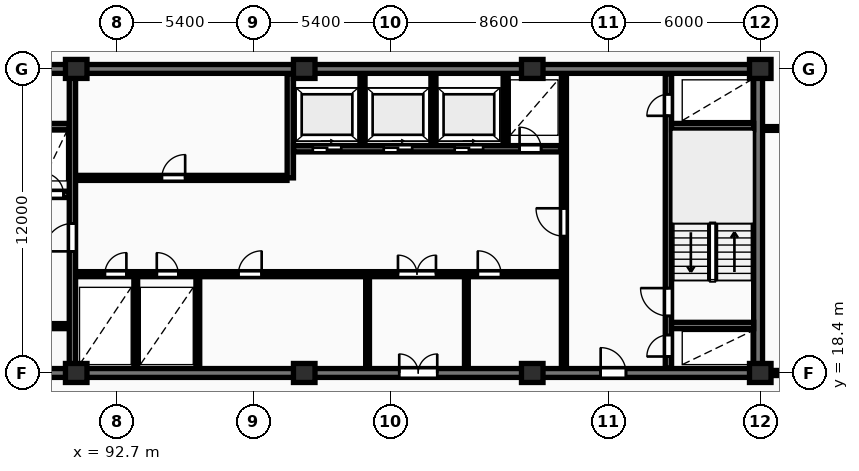
"""IFC4 building model, lengths in metres.
Left out: names, types, materials, properties, quantities, classifications, styles, units other than length and angle.
Written with IfcOpenShell. Run it as: python <this file> out.ifc"""

import sys

from ifc_helpers import new_model, si_unit, direction, frame, frame_2d, origin, origin_2d, place, context, subcontext, project, spatial, rectangle, extrude, element, fill, save


model = new_model("IFC4")
c1 = context("Model", 3, precision=1e-05, world=origin(), true_north=direction((0.0, 1.0)))
c2 = subcontext(c1, "Body", "Model", "MODEL_VIEW")
j1 = project(units=[si_unit("LENGTHUNIT", "METRE"), si_unit("PLANEANGLEUNIT", "RADIAN")], contexts=[c1])
p1 = place(None, origin())
s1 = spatial("IfcSite", under=j1, at=p1, CompositionType="ELEMENT")
p2 = place(p1, origin())
s2 = spatial("IfcBuilding", under=s1, at=p2, CompositionType="ELEMENT")
p3 = place(p2, frame((0.0, 0.0, 132.8)))
s3 = spatial("IfcBuildingStorey", under=s2, at=p3, CompositionType="ELEMENT", Elevation=132.8)
for number, where, z_axis, x_axis in (
    (1, (91.1, 18.4, 0.0), (0.0, 0.0, 1.0), (1.0, 0.0, 0.0)),
    (2, (91.1, 30.4, 0.0), (0.0, 0.0, 1.0), (1.0, 0.0, 0.0)),
    (3, (100.1, 18.4, 0.0), (0.0, 0.0, 1.0), (1.0, 0.0, 0.0)),
    (4, (100.1, 30.4, 0.0), (0.0, 0.0, 1.0), (1.0, 0.0, 0.0)),
    (5, (109.1, 18.4, 0.0), (0.0, 0.0, 1.0), (1.0, 0.0, 0.0)),
    (6, (109.1, 30.4, 0.0), (0.0, 0.0, 1.0), (1.0, 0.0, 0.0)),
    (7, (118.1, 18.4, 0.0), (0.0, 0.0, 1.0), (1.0, 0.0, 0.0)),
    (8, (118.1, 30.4, 0.0), (0.0, 0.0, 1.0), (1.0, 0.0, 0.0)),
):
    element("IfcColumn", number, at=place(p3, frame(where, z_axis=z_axis, x_axis=x_axis)), inside=s3, PredefinedType="COLUMN", context=c2, shape_type="SweptSolid", body=[
        extrude(rectangle(XDim=0.85, YDim=0.75, at=origin_2d()), origin(), (0.0, 0.0, 1.0), 3.25),
    ])
p4 = place(p3, frame((81.925, 30.4, 0.0), z_axis=(0.0, 0.0, 1.0), x_axis=(1.0, 0.0, 0.0)))
e9 = element("IfcWall", 9, at=p4, inside=s3, PredefinedType="SHEAR", context=c2, shape_type="SweptSolid", body=[
    extrude(rectangle(XDim=36.265, YDim=0.35, at=frame_2d((18.132, 0.0))), origin(), (0.0, 0.0, 1.0), 3.25),
])
p5 = place(p3, frame((118.015, 18.575, 0.0), z_axis=(0.0, 0.0, 1.0), x_axis=(0.0, 1.0, 0.0)))
e10 = element("IfcWall", 10, at=p5, inside=s3, PredefinedType="SHEAR", context=c2, shape_type="SweptSolid", body=[
    extrude(rectangle(XDim=11.65, YDim=0.35, at=frame_2d((5.825, 0.0))), origin(), (0.0, 0.0, 1.0), 3.25),
])
p6 = place(p3, frame((81.925, 18.4, 0.0), z_axis=(0.0, 0.0, 1.0), x_axis=(1.0, 0.0, 0.0)))
e11 = element("IfcWall", 11, at=p6, inside=s3, PredefinedType="SHEAR", context=c2, shape_type="SweptSolid", body=[
    extrude(rectangle(XDim=36.265, YDim=0.35, at=frame_2d((18.132, 0.0))), origin(), (0.0, 0.0, 1.0), 3.25),
])
p7 = place(p6, frame((5.675, 0.0, 0.0)))
e12 = element("IfcOpeningElement", 12, at=p7, cuts=e11, PredefinedType="OPENING", context=c2, shape_type="SweptSolid", body=[
    extrude(rectangle(XDim=1.0, YDim=2.15, at=frame_2d((0.5, 1.075))), frame((0.0, 0.185, 0.0), z_axis=(0.0, -1.0, 0.0), x_axis=(1.0, 0.0, 0.0)), (0.0, 0.0, 1.0), 0.37),
])
p8 = place(p6, frame((21.925, 0.0, 0.0)))
e13 = element("IfcOpeningElement", 13, at=p8, cuts=e11, PredefinedType="OPENING", context=c2, shape_type="SweptSolid", body=[
    extrude(rectangle(XDim=1.5, YDim=2.2, at=frame_2d((0.75, 1.1))), frame((0.0, 0.185, 0.0), z_axis=(0.0, -1.0, 0.0), x_axis=(1.0, 0.0, 0.0)), (0.0, 0.0, 1.0), 0.37),
])
p9 = place(p6, frame((29.875, 0.0, 0.0)))
e14 = element("IfcOpeningElement", 14, at=p9, cuts=e11, PredefinedType="OPENING", context=c2, shape_type="SweptSolid", body=[
    extrude(rectangle(XDim=1.0, YDim=2.15, at=frame_2d((0.5, 1.075))), frame((0.0, 0.185, 0.0), z_axis=(0.0, -1.0, 0.0), x_axis=(1.0, 0.0, 0.0)), (0.0, 0.0, 1.0), 0.37),
])
p10 = place(p3, frame((83.0, 28.125, 0.0), z_axis=(0.0, 0.0, 1.0), x_axis=(1.0, 0.0, 0.0)))
e15 = element("IfcWall", 15, at=p10, inside=s3, PredefinedType="SHEAR", context=c2, shape_type="SweptSolid", body=[
    extrude(rectangle(XDim=7.82, YDim=0.25, at=frame_2d((3.91, 0.0))), origin(), (0.0, 0.0, 1.0), 3.25),
])
p11 = place(p3, frame((86.5, 25.45, 0.0), z_axis=(0.0, 0.0, 1.0), x_axis=(1.0, 0.0, 0.0)))
e16 = element("IfcWall", 16, at=p11, inside=s3, PredefinedType="SHEAR", context=c2, shape_type="SweptSolid", body=[
    extrude(rectangle(XDim=4.32, YDim=0.25, at=frame_2d((2.16, 0.0))), origin(), (0.0, 0.0, 1.0), 3.25),
])
p12 = place(p11, frame((1.14, 0.0, 0.0)))
e17 = element("IfcOpeningElement", 17, at=p12, cuts=e16, PredefinedType="OPENING", context=c2, shape_type="SweptSolid", body=[
    extrude(rectangle(XDim=1.12, YDim=2.12, at=frame_2d((0.56, 1.06))), frame((0.0, 0.135, 0.0), z_axis=(0.0, -1.0, 0.0), x_axis=(1.0, 0.0, 0.0)), (0.0, 0.0, 1.0), 0.27),
])
p13 = place(p11, frame((3.25, 0.0, 0.0)))
e18 = element("IfcOpeningElement", 18, at=p13, cuts=e16, PredefinedType="OPENING", context=c2, shape_type="SweptSolid", body=[
    extrude(rectangle(XDim=0.85, YDim=2.05, at=frame_2d((0.425, 1.025))), frame((0.0, 0.135, 0.0), z_axis=(0.0, -1.0, 0.0), x_axis=(1.0, 0.0, 0.0)), (0.0, 0.0, 1.0), 0.27),
])
p14 = place(p3, frame((86.5, 20.25, 0.0), z_axis=(0.0, 0.0, 1.0), x_axis=(1.0, 0.0, 0.0)))
e19 = element("IfcWall", 19, at=p14, inside=s3, PredefinedType="PARTITIONING", context=c2, shape_type="SweptSolid", body=[
    extrude(rectangle(XDim=4.32, YDim=0.2, at=frame_2d((2.16, 0.0))), origin(), (0.0, 0.0, 1.0), 2.97),
])
p15 = place(p14, frame((1.4, 0.0, 0.0)))
e20 = element("IfcOpeningElement", 20, at=p15, cuts=e19, PredefinedType="OPENING", context=c2, shape_type="SweptSolid", body=[
    extrude(rectangle(XDim=1.1, YDim=2.1, at=frame_2d((0.55, 1.05))), frame((0.0, 0.11, 0.0), z_axis=(0.0, -1.0, 0.0), x_axis=(1.0, 0.0, 0.0)), (0.0, 0.0, 1.0), 0.22),
])
p16 = place(p3, frame((90.95, 18.6, 0.0), z_axis=(0.0, 0.0, 1.0), x_axis=(0.0, 1.0, 0.0)))
e21 = element("IfcWall", 21, at=p16, inside=s3, PredefinedType="SHEAR", context=c2, shape_type="SweptSolid", body=[
    extrude(rectangle(XDim=11.6, YDim=0.25, at=frame_2d((5.8, 0.0))), origin(), (0.0, 0.0, 1.0), 3.25),
])
p17 = place(p16, frame((4.6, 0.0, 0.0)))
e22 = element("IfcOpeningElement", 22, at=p17, cuts=e21, PredefinedType="OPENING", context=c2, shape_type="SweptSolid", body=[
    extrude(rectangle(XDim=1.1, YDim=2.1, at=frame_2d((0.55, 1.05))), frame((0.0, 0.135, 0.0), z_axis=(0.0, -1.0, 0.0), x_axis=(1.0, 0.0, 0.0)), (0.0, 0.0, 1.0), 0.27),
])
p18 = place(p3, frame((91.08, 26.1, 0.0), z_axis=(0.0, 0.0, 1.0), x_axis=(1.0, 0.0, 0.0)))
e23 = element("IfcWall", 23, at=p18, inside=s3, PredefinedType="PARTITIONING", context=c2, shape_type="SweptSolid", body=[
    extrude(rectangle(XDim=8.34, YDim=0.2, at=frame_2d((4.17, 0.0))), origin(), (0.0, 0.0, 1.0), 2.97),
])
p19 = place(p18, frame((3.4, 0.0, 0.0)))
e24 = element("IfcOpeningElement", 24, at=p19, cuts=e23, PredefinedType="OPENING", context=c2, shape_type="SweptSolid", body=[
    extrude(rectangle(XDim=0.92, YDim=2.08, at=frame_2d((0.46, 1.04))), frame((0.0, 0.11, 0.0), z_axis=(0.0, -1.0, 0.0), x_axis=(1.0, 0.0, 0.0)), (0.0, 0.0, 1.0), 0.22),
])
p20 = place(p3, frame((99.55, 26.1, 0.0), z_axis=(0.0, 0.0, 1.0), x_axis=(0.0, 1.0, 0.0)))
e25 = element("IfcWall", 25, at=p20, inside=s3, PredefinedType="SHEAR", context=c2, shape_type="SweptSolid", body=[
    extrude(rectangle(XDim=4.1, YDim=0.25, at=frame_2d((2.05, 0.0))), origin(), (0.0, 0.0, 1.0), 3.25),
])
for number, where, z_axis, x_axis in (
    (26, (102.4, 27.38, 0.0), (0.0, 0.0, 1.0), (0.0, 1.0, 0.0)),
    (27, (105.2, 27.38, 0.0), (0.0, 0.0, 1.0), (0.0, 1.0, 0.0)),
    (28, (108.05, 27.38, 0.0), (0.0, 0.0, 1.0), (0.0, 1.0, 0.0)),
):
    element("IfcWall", number, at=place(p3, frame(where, z_axis=z_axis, x_axis=x_axis)), inside=s3, PredefinedType="PARTITIONING", context=c2, shape_type="SweptSolid", body=[
        extrude(rectangle(XDim=2.82, YDim=0.2, at=frame_2d((1.41, 0.0))), origin(), (0.0, 0.0, 1.0), 2.97),
    ])
p21 = place(p3, frame((99.68, 27.25, 0.0), z_axis=(0.0, 0.0, 1.0), x_axis=(1.0, 0.0, 0.0)))
e29 = element("IfcWall", 29, at=p21, inside=s3, PredefinedType="SHEAR", context=c2, shape_type="SweptSolid", body=[
    extrude(rectangle(XDim=10.54, YDim=0.25, at=frame_2d((5.27, 0.0))), origin(), (0.0, 0.0, 1.0), 3.25),
])
p22 = place(p21, frame((0.76, 0.0, 0.0)))
e30 = element("IfcOpeningElement", 30, at=p22, cuts=e29, PredefinedType="OPENING", context=c2, shape_type="SweptSolid", body=[
    extrude(rectangle(XDim=1.12, YDim=2.12, at=frame_2d((0.56, 1.06))), frame((0.0, 0.135, 0.0), z_axis=(0.0, -1.0, 0.0), x_axis=(1.0, 0.0, 0.0)), (0.0, 0.0, 1.0), 0.27),
])
p23 = place(p21, frame((3.56, 0.0, 0.0)))
e31 = element("IfcOpeningElement", 31, at=p23, cuts=e29, PredefinedType="OPENING", context=c2, shape_type="SweptSolid", body=[
    extrude(rectangle(XDim=1.12, YDim=2.12, at=frame_2d((0.56, 1.06))), frame((0.0, 0.135, 0.0), z_axis=(0.0, -1.0, 0.0), x_axis=(1.0, 0.0, 0.0)), (0.0, 0.0, 1.0), 0.27),
])
p24 = place(p21, frame((6.36, 0.0, 0.0)))
e32 = element("IfcOpeningElement", 32, at=p24, cuts=e29, PredefinedType="OPENING", context=c2, shape_type="SweptSolid", body=[
    extrude(rectangle(XDim=1.12, YDim=2.12, at=frame_2d((0.56, 1.06))), frame((0.0, 0.135, 0.0), z_axis=(0.0, -1.0, 0.0), x_axis=(1.0, 0.0, 0.0)), (0.0, 0.0, 1.0), 0.27),
])
p25 = place(p21, frame((8.92, 0.0, 0.0)))
e33 = element("IfcOpeningElement", 33, at=p25, cuts=e29, PredefinedType="OPENING", context=c2, shape_type="SweptSolid", body=[
    extrude(rectangle(XDim=0.85, YDim=2.05, at=frame_2d((0.425, 1.025))), frame((0.0, 0.135, 0.0), z_axis=(0.0, -1.0, 0.0), x_axis=(1.0, 0.0, 0.0)), (0.0, 0.0, 1.0), 0.27),
])
for number, where, z_axis, x_axis in (
    (34, (93.45, 18.6, 0.0), (0.0, 0.0, 1.0), (0.0, 1.0, 0.0)),
    (35, (95.9, 18.6, 0.0), (0.0, 0.0, 1.0), (0.0, 1.0, 0.0)),
    (36, (102.6, 18.6, 0.0), (0.0, 0.0, 1.0), (0.0, 1.0, 0.0)),
    (37, (106.5, 18.6, 0.0), (0.0, 0.0, 1.0), (0.0, 1.0, 0.0)),
):
    element("IfcWall", number, at=place(p3, frame(where, z_axis=z_axis, x_axis=x_axis)), inside=s3, PredefinedType="PARTITIONING", context=c2, shape_type="SweptSolid", body=[
        extrude(rectangle(XDim=3.6, YDim=0.15, at=frame_2d((1.8, 0.0))), origin(), (0.0, 0.0, 1.0), 2.97),
    ])
p26 = place(p3, frame((91.08, 22.3, 0.0), z_axis=(0.0, 0.0, 1.0), x_axis=(1.0, 0.0, 0.0)))
e38 = element("IfcWall", 38, at=p26, inside=s3, PredefinedType="PARTITIONING", context=c2, shape_type="SweptSolid", body=[
    extrude(rectangle(XDim=19.14, YDim=0.2, at=frame_2d((9.57, 0.0))), origin(), (0.0, 0.0, 1.0), 2.97),
])
p27 = place(p26, frame((1.15, 0.0, 0.0)))
e39 = element("IfcOpeningElement", 39, at=p27, cuts=e38, PredefinedType="OPENING", context=c2, shape_type="SweptSolid", body=[
    extrude(rectangle(XDim=0.85, YDim=2.05, at=frame_2d((0.425, 1.025))), frame((0.0, 0.11, 0.0), z_axis=(0.0, -1.0, 0.0), x_axis=(1.0, 0.0, 0.0)), (0.0, 0.0, 1.0), 0.22),
])
p28 = place(p26, frame((3.2, 0.0, 0.0)))
e40 = element("IfcOpeningElement", 40, at=p28, cuts=e38, PredefinedType="OPENING", context=c2, shape_type="SweptSolid", body=[
    extrude(rectangle(XDim=0.85, YDim=2.05, at=frame_2d((0.425, 1.025))), frame((0.0, 0.11, 0.0), z_axis=(0.0, -1.0, 0.0), x_axis=(1.0, 0.0, 0.0)), (0.0, 0.0, 1.0), 0.22),
])
p29 = place(p26, frame((12.72, 0.0, 0.0)))
e41 = element("IfcOpeningElement", 41, at=p29, cuts=e38, PredefinedType="OPENING", context=c2, shape_type="SweptSolid", body=[
    extrude(rectangle(XDim=1.5, YDim=2.2, at=frame_2d((0.75, 1.1))), frame((0.0, 0.11, 0.0), z_axis=(0.0, -1.0, 0.0), x_axis=(1.0, 0.0, 0.0)), (0.0, 0.0, 1.0), 0.22),
])
p30 = place(p26, frame((6.42, 0.0, 0.0)))
e42 = element("IfcOpeningElement", 42, at=p30, cuts=e38, PredefinedType="OPENING", context=c2, shape_type="SweptSolid", body=[
    extrude(rectangle(XDim=0.92, YDim=2.08, at=frame_2d((0.46, 1.04))), frame((0.0, 0.11, 0.0), z_axis=(0.0, -1.0, 0.0), x_axis=(1.0, 0.0, 0.0)), (0.0, 0.0, 1.0), 0.22),
])
p31 = place(p26, frame((15.87, 0.0, 0.0)))
e43 = element("IfcOpeningElement", 43, at=p31, cuts=e38, PredefinedType="OPENING", context=c2, shape_type="SweptSolid", body=[
    extrude(rectangle(XDim=0.92, YDim=2.08, at=frame_2d((0.46, 1.04))), frame((0.0, 0.11, 0.0), z_axis=(0.0, -1.0, 0.0), x_axis=(1.0, 0.0, 0.0)), (0.0, 0.0, 1.0), 0.22),
])
p32 = place(p3, frame((110.35, 18.6, 0.0), z_axis=(0.0, 0.0, 1.0), x_axis=(0.0, 1.0, 0.0)))
e44 = element("IfcWall", 44, at=p32, inside=s3, PredefinedType="PARTITIONING", context=c2, shape_type="SweptSolid", body=[
    extrude(rectangle(XDim=11.6, YDim=0.2, at=frame_2d((5.8, 0.0))), origin(), (0.0, 0.0, 1.0), 2.97),
])
p33 = place(p32, frame((5.2, 0.0, 0.0)))
e45 = element("IfcOpeningElement", 45, at=p33, cuts=e44, PredefinedType="OPENING", context=c2, shape_type="SweptSolid", body=[
    extrude(rectangle(XDim=1.1, YDim=2.15, at=frame_2d((0.55, 1.075))), frame((0.0, 0.11, 0.0), z_axis=(0.0, -1.0, 0.0), x_axis=(1.0, 0.0, 0.0)), (0.0, 0.0, 1.0), 0.22),
])
p34 = place(p3, frame((114.475, 18.6, 0.0), z_axis=(0.0, 0.0, 1.0), x_axis=(0.0, 1.0, 0.0)))
e46 = element("IfcWall", 46, at=p34, inside=s3, PredefinedType="SHEAR", context=c2, shape_type="SweptSolid", body=[
    extrude(rectangle(XDim=11.6, YDim=0.25, at=frame_2d((5.8, 0.0))), origin(), (0.0, 0.0, 1.0), 3.25),
])
p35 = place(p34, frame((0.45, 0.0, 0.0)))
e47 = element("IfcOpeningElement", 47, at=p35, cuts=e46, PredefinedType="OPENING", context=c2, shape_type="SweptSolid", body=[
    extrude(rectangle(XDim=0.85, YDim=2.05, at=frame_2d((0.425, 1.025))), frame((0.0, 0.135, 0.0), z_axis=(0.0, -1.0, 0.0), x_axis=(1.0, 0.0, 0.0)), (0.0, 0.0, 1.0), 0.27),
])
p36 = place(p34, frame((2.05, 0.0, 0.0)))
e48 = element("IfcOpeningElement", 48, at=p36, cuts=e46, PredefinedType="OPENING", context=c2, shape_type="SweptSolid", body=[
    extrude(rectangle(XDim=1.1, YDim=2.1, at=frame_2d((0.55, 1.05))), frame((0.0, 0.135, 0.0), z_axis=(0.0, -1.0, 0.0), x_axis=(1.0, 0.0, 0.0)), (0.0, 0.0, 1.0), 0.27),
])
p37 = place(p34, frame((9.95, 0.0, 0.0)))
e49 = element("IfcOpeningElement", 49, at=p37, cuts=e46, PredefinedType="OPENING", context=c2, shape_type="SweptSolid", body=[
    extrude(rectangle(XDim=0.85, YDim=2.05, at=frame_2d((0.425, 1.025))), frame((0.0, 0.135, 0.0), z_axis=(0.0, -1.0, 0.0), x_axis=(1.0, 0.0, 0.0)), (0.0, 0.0, 1.0), 0.27),
])
for number, where, z_axis, x_axis in (
    (50, (114.6, 20.275, 0.0), (0.0, 0.0, 1.0), (1.0, 0.0, 0.0)),
    (51, (114.6, 28.125, 0.0), (0.0, 0.0, 1.0), (1.0, 0.0, 0.0)),
):
    element("IfcWall", number, at=place(p3, frame(where, z_axis=z_axis, x_axis=x_axis)), inside=s3, PredefinedType="SHEAR", context=c2, shape_type="SweptSolid", body=[
        extrude(rectangle(XDim=3.24, YDim=0.25, at=frame_2d((1.62, 0.0))), origin(), (0.0, 0.0, 1.0), 3.25),
    ])
p38 = place(p3, frame((118.27, 28.05, 0.0), z_axis=(0.0, 0.0, 1.0), x_axis=(1.0, 0.0, 0.0)))
e52 = element("IfcWall", 52, at=p38, inside=s3, PredefinedType="PARTITIONING", context=c2, shape_type="SweptSolid", body=[
    extrude(rectangle(XDim=6.76, YDim=0.15, at=frame_2d((3.38, 0.0))), origin(), (0.0, 0.0, 1.0), 2.97),
])
p39 = place(p38, frame((1.587, 0.0, 0.0)))
e53 = element("IfcOpeningElement", 53, at=p39, cuts=e52, PredefinedType="OPENING", context=c2, shape_type="SweptSolid", body=[
    extrude(rectangle(XDim=0.84, YDim=2.04, at=frame_2d((0.42, 1.02))), frame((0.0, 0.085, 0.0), z_axis=(0.0, -1.0, 0.0), x_axis=(1.0, 0.0, 0.0)), (0.0, 0.0, 1.0), 0.17),
])
p40 = place(p38, frame((2.94, 0.0, 0.0)))
e54 = element("IfcOpeningElement", 54, at=p40, cuts=e52, PredefinedType="OPENING", context=c2, shape_type="SweptSolid", body=[
    extrude(rectangle(XDim=0.88, YDim=2.06, at=frame_2d((0.44, 1.03))), frame((0.0, 0.085, 0.0), z_axis=(0.0, -1.0, 0.0), x_axis=(1.0, 0.0, 0.0)), (0.0, 0.0, 1.0), 0.17),
])
p41 = place(p3, frame((118.25, 18.4, 0.0), z_axis=(0.0, 0.0, 1.0), x_axis=(1.0, 0.0, 0.0)))
e55 = element("IfcWall", 55, at=p41, inside=s3, PredefinedType="PARTITIONING", context=c2, shape_type="SweptSolid", body=[
    extrude(rectangle(XDim=12.45, YDim=0.2, at=frame_2d((6.225, 0.0))), origin(), (0.0, 0.0, 1.0), 2.358),
])
p42 = place(p41, frame((1.51, 0.0, 0.0)))
e56 = element("IfcOpeningElement", 56, at=p42, cuts=e55, PredefinedType="OPENING", context=c2, shape_type="SweptSolid", body=[
    extrude(rectangle(XDim=0.95, YDim=2.15, at=frame_2d((0.475, 1.075))), frame((0.0, 0.11, 0.0), z_axis=(0.0, -1.0, 0.0), x_axis=(1.0, 0.0, 0.0)), (0.0, 0.0, 1.0), 0.22),
])
p43 = place(p8, origin())
e57 = element("IfcDoor", 57, at=p43, inside=s3, OperationType="DOUBLE_DOOR_SINGLE_SWING", PredefinedType="DOOR", context=c2, shape_type="SweptSolid", body=[
    extrude(rectangle(XDim=1.5, YDim=2.2, at=frame_2d((0.75, 1.1))), frame((0.0, 0.025, 0.0), z_axis=(0.0, -1.0, 0.0), x_axis=(1.0, 0.0, 0.0)), (0.0, 0.0, 1.0), 0.05),
])
fill(e13, e57)
p44 = place(p9, origin())
e58 = element("IfcDoor", 58, at=p44, inside=s3, OperationType="SINGLE_SWING_LEFT", PredefinedType="DOOR", context=c2, shape_type="SweptSolid", body=[
    extrude(rectangle(XDim=1.0, YDim=2.15, at=frame_2d((0.5, 1.075))), frame((0.0, 0.025, 0.0), z_axis=(0.0, -1.0, 0.0), x_axis=(1.0, 0.0, 0.0)), (0.0, 0.0, 1.0), 0.05),
])
fill(e14, e58)
p45 = place(p13, origin())
e59 = element("IfcDoor", 59, at=p45, inside=s3, OperationType="SINGLE_SWING_LEFT", PredefinedType="DOOR", context=c2, shape_type="SweptSolid", body=[
    extrude(rectangle(XDim=0.85, YDim=2.05, at=frame_2d((0.425, 1.025))), frame((0.0, 0.025, 0.0), z_axis=(0.0, -1.0, 0.0), x_axis=(1.0, 0.0, 0.0)), (0.0, 0.0, 1.0), 0.05),
])
fill(e18, e59)
p46 = place(p17, origin())
e60 = element("IfcDoor", 60, at=p46, inside=s3, OperationType="SINGLE_SWING_LEFT", PredefinedType="DOOR", context=c2, shape_type="SweptSolid", body=[
    extrude(rectangle(XDim=1.1, YDim=2.1, at=frame_2d((0.55, 1.05))), frame((0.0, 0.025, 0.0), z_axis=(0.0, -1.0, 0.0), x_axis=(1.0, 0.0, 0.0)), (0.0, 0.0, 1.0), 0.05),
])
fill(e22, e60)
p47 = place(p19, origin())
e61 = element("IfcDoor", 61, at=p47, inside=s3, OperationType="SINGLE_SWING_RIGHT", PredefinedType="DOOR", context=c2, shape_type="SweptSolid", body=[
    extrude(rectangle(XDim=0.92, YDim=2.08, at=frame_2d((0.46, 1.04))), frame((0.0, 0.025, 0.0), z_axis=(0.0, -1.0, 0.0), x_axis=(1.0, 0.0, 0.0)), (0.0, 0.0, 1.0), 0.05),
])
fill(e24, e61)
p48 = place(p22, origin())
e62 = element("IfcDoor", 62, at=p48, inside=s3, OperationType="SLIDING_TO_RIGHT", PredefinedType="DOOR", context=c2, shape_type="SweptSolid", body=[
    extrude(rectangle(XDim=1.12, YDim=2.12, at=frame_2d((0.56, 1.06))), frame((0.0, 0.025, 0.0), z_axis=(0.0, -1.0, 0.0), x_axis=(1.0, 0.0, 0.0)), (0.0, 0.0, 1.0), 0.05),
])
fill(e30, e62)
p49 = place(p23, origin())
e63 = element("IfcDoor", 63, at=p49, inside=s3, OperationType="SLIDING_TO_RIGHT", PredefinedType="DOOR", context=c2, shape_type="SweptSolid", body=[
    extrude(rectangle(XDim=1.12, YDim=2.12, at=frame_2d((0.56, 1.06))), frame((0.0, 0.025, 0.0), z_axis=(0.0, -1.0, 0.0), x_axis=(1.0, 0.0, 0.0)), (0.0, 0.0, 1.0), 0.05),
])
fill(e31, e63)
p50 = place(p24, origin())
e64 = element("IfcDoor", 64, at=p50, inside=s3, OperationType="SLIDING_TO_RIGHT", PredefinedType="DOOR", context=c2, shape_type="SweptSolid", body=[
    extrude(rectangle(XDim=1.12, YDim=2.12, at=frame_2d((0.56, 1.06))), frame((0.0, 0.025, 0.0), z_axis=(0.0, -1.0, 0.0), x_axis=(1.0, 0.0, 0.0)), (0.0, 0.0, 1.0), 0.05),
])
fill(e32, e64)
p51 = place(p25, origin())
e65 = element("IfcDoor", 65, at=p51, inside=s3, OperationType="SINGLE_SWING_LEFT", PredefinedType="DOOR", context=c2, shape_type="SweptSolid", body=[
    extrude(rectangle(XDim=0.85, YDim=2.05, at=frame_2d((0.425, 1.025))), frame((0.0, 0.025, 0.0), z_axis=(0.0, -1.0, 0.0), x_axis=(1.0, 0.0, 0.0)), (0.0, 0.0, 1.0), 0.05),
])
fill(e33, e65)
p52 = place(p27, origin())
e66 = element("IfcDoor", 66, at=p52, inside=s3, OperationType="SINGLE_SWING_RIGHT", PredefinedType="DOOR", context=c2, shape_type="SweptSolid", body=[
    extrude(rectangle(XDim=0.85, YDim=2.05, at=frame_2d((0.425, 1.025))), frame((0.0, 0.025, 0.0), z_axis=(0.0, -1.0, 0.0), x_axis=(1.0, 0.0, 0.0)), (0.0, 0.0, 1.0), 0.05),
])
fill(e39, e66)
p53 = place(p28, origin())
e67 = element("IfcDoor", 67, at=p53, inside=s3, OperationType="SINGLE_SWING_LEFT", PredefinedType="DOOR", context=c2, shape_type="SweptSolid", body=[
    extrude(rectangle(XDim=0.85, YDim=2.05, at=frame_2d((0.425, 1.025))), frame((0.0, 0.025, 0.0), z_axis=(0.0, -1.0, 0.0), x_axis=(1.0, 0.0, 0.0)), (0.0, 0.0, 1.0), 0.05),
])
fill(e40, e67)
p54 = place(p29, origin())
e68 = element("IfcDoor", 68, at=p54, inside=s3, OperationType="DOUBLE_DOOR_SINGLE_SWING", PredefinedType="DOOR", context=c2, shape_type="SweptSolid", body=[
    extrude(rectangle(XDim=1.5, YDim=2.2, at=frame_2d((0.75, 1.1))), frame((0.0, 0.025, 0.0), z_axis=(0.0, -1.0, 0.0), x_axis=(1.0, 0.0, 0.0)), (0.0, 0.0, 1.0), 0.05),
])
fill(e41, e68)
p55 = place(p30, origin())
e69 = element("IfcDoor", 69, at=p55, inside=s3, OperationType="SINGLE_SWING_RIGHT", PredefinedType="DOOR", context=c2, shape_type="SweptSolid", body=[
    extrude(rectangle(XDim=0.92, YDim=2.08, at=frame_2d((0.46, 1.04))), frame((0.0, 0.025, 0.0), z_axis=(0.0, -1.0, 0.0), x_axis=(1.0, 0.0, 0.0)), (0.0, 0.0, 1.0), 0.05),
])
fill(e42, e69)
p56 = place(p31, origin())
e70 = element("IfcDoor", 70, at=p56, inside=s3, OperationType="SINGLE_SWING_LEFT", PredefinedType="DOOR", context=c2, shape_type="SweptSolid", body=[
    extrude(rectangle(XDim=0.92, YDim=2.08, at=frame_2d((0.46, 1.04))), frame((0.0, 0.025, 0.0), z_axis=(0.0, -1.0, 0.0), x_axis=(1.0, 0.0, 0.0)), (0.0, 0.0, 1.0), 0.05),
])
fill(e43, e70)
p57 = place(p33, origin())
e71 = element("IfcDoor", 71, at=p57, inside=s3, OperationType="SINGLE_SWING_RIGHT", PredefinedType="DOOR", context=c2, shape_type="SweptSolid", body=[
    extrude(rectangle(XDim=1.1, YDim=2.15, at=frame_2d((0.55, 1.075))), frame((0.0, 0.025, 0.0), z_axis=(0.0, -1.0, 0.0), x_axis=(1.0, 0.0, 0.0)), (0.0, 0.0, 1.0), 0.05),
])
fill(e45, e71)
p58 = place(p35, origin())
e72 = element("IfcDoor", 72, at=p58, inside=s3, OperationType="SINGLE_SWING_LEFT", PredefinedType="DOOR", context=c2, shape_type="SweptSolid", body=[
    extrude(rectangle(XDim=0.85, YDim=2.05, at=frame_2d((0.425, 1.025))), frame((0.0, 0.025, 0.0), z_axis=(0.0, -1.0, 0.0), x_axis=(1.0, 0.0, 0.0)), (0.0, 0.0, 1.0), 0.05),
])
fill(e47, e72)
p59 = place(p36, origin())
e73 = element("IfcDoor", 73, at=p59, inside=s3, OperationType="SINGLE_SWING_RIGHT", PredefinedType="DOOR", context=c2, shape_type="SweptSolid", body=[
    extrude(rectangle(XDim=1.1, YDim=2.1, at=frame_2d((0.55, 1.05))), frame((0.0, 0.025, 0.0), z_axis=(0.0, -1.0, 0.0), x_axis=(1.0, 0.0, 0.0)), (0.0, 0.0, 1.0), 0.05),
])
fill(e48, e73)
p60 = place(p37, origin())
e74 = element("IfcDoor", 74, at=p60, inside=s3, OperationType="SINGLE_SWING_LEFT", PredefinedType="DOOR", context=c2, shape_type="SweptSolid", body=[
    extrude(rectangle(XDim=0.85, YDim=2.05, at=frame_2d((0.425, 1.025))), frame((0.0, 0.025, 0.0), z_axis=(0.0, -1.0, 0.0), x_axis=(1.0, 0.0, 0.0)), (0.0, 0.0, 1.0), 0.05),
])
fill(e49, e74)
save(model, sys.argv[1])
